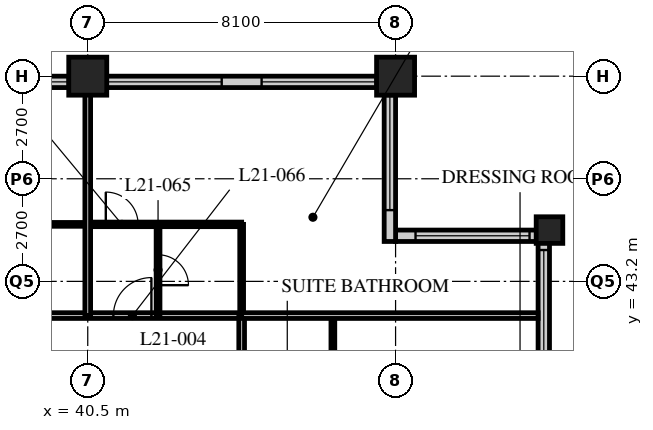
"""IFC4 building model, lengths in metres.
Left out: names, types, materials, properties, quantities, classifications, styles, units other than length and angle.
Written with IfcOpenShell. Run it as: python <this file> out.ifc"""

import sys

from ifc_helpers import new_model, si_unit, direction, frame, frame_2d, origin, origin_2d, place, context, subcontext, project, spatial, rectangle, hollow_rectangle, extrude, element, fill, save


model = new_model("IFC4")
c1 = context("Model", 3, precision=1e-05, world=origin(), true_north=direction((0.0, 1.0)))
c2 = subcontext(c1, "Body", "Model", "MODEL_VIEW")
j1 = project(units=[si_unit("LENGTHUNIT", "METRE"), si_unit("PLANEANGLEUNIT", "RADIAN")], contexts=[c1])
p1 = place(None, origin())
s1 = spatial("IfcSite", under=j1, at=p1, CompositionType="ELEMENT")
p2 = place(p1, origin())
s2 = spatial("IfcBuilding", under=s1, at=p2, CompositionType="ELEMENT")
p3 = place(p2, frame((0.0, 0.0, 84.0)))
s3 = spatial("IfcBuildingStorey", under=s2, at=p3, CompositionType="ELEMENT", Elevation=84.0)
for number, where, z_axis, x_axis in (
    (1, (40.5, 48.6, 0.0), (0.0, 0.0, 1.0), (1.0, 0.0, 0.0)),
    (2, (48.6, 48.6, 0.0), (0.0, 0.0, 1.0), (1.0, 0.0, 0.0)),
):
    element("IfcColumn", number, at=place(p3, frame(where, z_axis=z_axis, x_axis=x_axis)), inside=s3, PredefinedType="COLUMN", context=c2, shape_type="SweptSolid", body=[
        extrude(hollow_rectangle(XDim=1.0, YDim=1.0, WallThickness=0.1, at=origin_2d()), origin(), (0.0, 0.0, 1.0), 3.4),
    ])
p4 = place(p3, frame((52.65, 44.55, 0.0), z_axis=(0.0, 0.0, 1.0), x_axis=(1.0, 0.0, 0.0)))
e3 = element("IfcColumn", 3, at=p4, inside=s3, PredefinedType="COLUMN", context=c2, shape_type="SweptSolid", body=[
    extrude(hollow_rectangle(XDim=0.7, YDim=0.7, WallThickness=0.07, at=origin_2d()), origin(), (0.0, 0.0, 1.0), 3.4),
])
p5 = place(p3, frame((52.5, 40.2, 0.0), z_axis=(0.0, 0.0, 1.0), x_axis=(0.0, 1.0, 0.0)))
e4 = element("IfcWall", 4, at=p5, inside=s3, PredefinedType="SOLIDWALL", context=c2, shape_type="SweptSolid", body=[
    extrude(rectangle(XDim=4.35, YDim=0.3, at=frame_2d((2.175, 0.0))), origin(), (0.0, 0.0, 1.0), 3.19),
])
p6 = place(p5, frame((0.825, 0.0, 0.9)))
e5 = element("IfcOpeningElement", 5, at=p6, cuts=e4, PredefinedType="OPENING", context=c2, shape_type="SweptSolid", body=[
    extrude(rectangle(XDim=3.0, YDim=1.5, at=frame_2d((1.5, 0.75))), frame((0.0, 0.16, 0.0), z_axis=(0.0, -1.0, 0.0), x_axis=(1.0, 0.0, 0.0)), (0.0, 0.0, 1.0), 0.32),
])
p7 = place(p3, frame((52.35, 44.4, 0.0), z_axis=(0.0, 0.0, 1.0), x_axis=(-1.0, 0.0, 0.0)))
e6 = element("IfcWall", 6, at=p7, inside=s3, PredefinedType="SOLIDWALL", context=c2, shape_type="SweptSolid", body=[
    extrude(rectangle(XDim=3.75, YDim=0.3, at=frame_2d((1.875, 0.0))), origin(), (0.0, 0.0, 1.0), 3.19),
])
p8 = place(p7, frame((0.225, 0.0, 0.9)))
e7 = element("IfcOpeningElement", 7, at=p8, cuts=e6, PredefinedType="OPENING", context=c2, shape_type="SweptSolid", body=[
    extrude(rectangle(XDim=3.0, YDim=1.5, at=frame_2d((1.5, 0.75))), frame((0.0, 0.16, 0.0), z_axis=(0.0, -1.0, 0.0), x_axis=(1.0, 0.0, 0.0)), (0.0, 0.0, 1.0), 0.32),
])
p9 = place(p3, frame((48.45, 44.25, 0.0), z_axis=(0.0, 0.0, 1.0), x_axis=(0.0, 1.0, 0.0)))
e8 = element("IfcWall", 8, at=p9, inside=s3, PredefinedType="SOLIDWALL", context=c2, shape_type="SweptSolid", body=[
    extrude(rectangle(XDim=4.35, YDim=0.3, at=frame_2d((2.175, 0.0))), origin(), (0.0, 0.0, 1.0), 3.19),
])
p10 = place(p9, frame((0.825, 0.0, 0.9)))
e9 = element("IfcOpeningElement", 9, at=p10, cuts=e8, PredefinedType="OPENING", context=c2, shape_type="SweptSolid", body=[
    extrude(rectangle(XDim=3.0, YDim=1.5, at=frame_2d((1.5, 0.75))), frame((0.0, 0.16, 0.0), z_axis=(0.0, -1.0, 0.0), x_axis=(1.0, 0.0, 0.0)), (0.0, 0.0, 1.0), 0.32),
])
p11 = place(p3, frame((48.3, 48.45, 0.0), z_axis=(0.0, 0.0, 1.0), x_axis=(-1.0, 0.0, 0.0)))
e10 = element("IfcWall", 10, at=p11, inside=s3, PredefinedType="SOLIDWALL", context=c2, shape_type="SweptSolid", body=[
    extrude(rectangle(XDim=40.2, YDim=0.3, at=frame_2d((20.1, 0.0))), origin(), (0.0, 0.0, 1.0), 3.19),
])
p12 = place(p11, frame((0.225, 0.0, 0.9)))
e11 = element("IfcOpeningElement", 11, at=p12, cuts=e10, PredefinedType="OPENING", context=c2, shape_type="SweptSolid", body=[
    extrude(rectangle(XDim=3.0, YDim=1.5, at=frame_2d((1.5, 0.75))), frame((0.0, 0.16, 0.0), z_axis=(0.0, -1.0, 0.0), x_axis=(1.0, 0.0, 0.0)), (0.0, 0.0, 1.0), 0.32),
])
p13 = place(p11, frame((4.275, 0.0, 0.9)))
e12 = element("IfcOpeningElement", 12, at=p13, cuts=e10, PredefinedType="OPENING", context=c2, shape_type="SweptSolid", body=[
    extrude(rectangle(XDim=3.0, YDim=1.5, at=frame_2d((1.5, 0.75))), frame((0.0, 0.16, 0.0), z_axis=(0.0, -1.0, 0.0), x_axis=(1.0, 0.0, 0.0)), (0.0, 0.0, 1.0), 0.32),
])
p14 = place(p11, frame((8.325, 0.0, 0.9)))
e13 = element("IfcOpeningElement", 13, at=p14, cuts=e10, PredefinedType="OPENING", context=c2, shape_type="SweptSolid", body=[
    extrude(rectangle(XDim=3.0, YDim=1.5, at=frame_2d((1.5, 0.75))), frame((0.0, 0.16, 0.0), z_axis=(0.0, -1.0, 0.0), x_axis=(1.0, 0.0, 0.0)), (0.0, 0.0, 1.0), 0.32),
])
p15 = place(p11, frame((12.375, 0.0, 0.9)))
e14 = element("IfcOpeningElement", 14, at=p15, cuts=e10, PredefinedType="OPENING", context=c2, shape_type="SweptSolid", body=[
    extrude(rectangle(XDim=3.0, YDim=1.5, at=frame_2d((1.5, 0.75))), frame((0.0, 0.16, 0.0), z_axis=(0.0, -1.0, 0.0), x_axis=(1.0, 0.0, 0.0)), (0.0, 0.0, 1.0), 0.32),
])
p16 = place(p11, frame((16.425, 0.0, 0.9)))
e15 = element("IfcOpeningElement", 15, at=p16, cuts=e10, PredefinedType="OPENING", context=c2, shape_type="SweptSolid", body=[
    extrude(rectangle(XDim=3.0, YDim=1.5, at=frame_2d((1.5, 0.75))), frame((0.0, 0.16, 0.0), z_axis=(0.0, -1.0, 0.0), x_axis=(1.0, 0.0, 0.0)), (0.0, 0.0, 1.0), 0.32),
])
p17 = place(p11, frame((20.475, 0.0, 0.9)))
e16 = element("IfcOpeningElement", 16, at=p17, cuts=e10, PredefinedType="OPENING", context=c2, shape_type="SweptSolid", body=[
    extrude(rectangle(XDim=3.0, YDim=1.5, at=frame_2d((1.5, 0.75))), frame((0.0, 0.16, 0.0), z_axis=(0.0, -1.0, 0.0), x_axis=(1.0, 0.0, 0.0)), (0.0, 0.0, 1.0), 0.32),
])
p18 = place(p11, frame((24.525, 0.0, 0.9)))
e17 = element("IfcOpeningElement", 17, at=p18, cuts=e10, PredefinedType="OPENING", context=c2, shape_type="SweptSolid", body=[
    extrude(rectangle(XDim=3.0, YDim=1.5, at=frame_2d((1.5, 0.75))), frame((0.0, 0.16, 0.0), z_axis=(0.0, -1.0, 0.0), x_axis=(1.0, 0.0, 0.0)), (0.0, 0.0, 1.0), 0.32),
])
p19 = place(p11, frame((28.575, 0.0, 0.9)))
e18 = element("IfcOpeningElement", 18, at=p19, cuts=e10, PredefinedType="OPENING", context=c2, shape_type="SweptSolid", body=[
    extrude(rectangle(XDim=3.0, YDim=1.5, at=frame_2d((1.5, 0.75))), frame((0.0, 0.16, 0.0), z_axis=(0.0, -1.0, 0.0), x_axis=(1.0, 0.0, 0.0)), (0.0, 0.0, 1.0), 0.32),
])
p20 = place(p11, frame((32.625, 0.0, 0.9)))
e19 = element("IfcOpeningElement", 19, at=p20, cuts=e10, PredefinedType="OPENING", context=c2, shape_type="SweptSolid", body=[
    extrude(rectangle(XDim=3.0, YDim=1.5, at=frame_2d((1.5, 0.75))), frame((0.0, 0.16, 0.0), z_axis=(0.0, -1.0, 0.0), x_axis=(1.0, 0.0, 0.0)), (0.0, 0.0, 1.0), 0.32),
])
p21 = place(p11, frame((36.675, 0.0, 0.9)))
e20 = element("IfcOpeningElement", 20, at=p21, cuts=e10, PredefinedType="OPENING", context=c2, shape_type="SweptSolid", body=[
    extrude(rectangle(XDim=3.0, YDim=1.5, at=frame_2d((1.5, 0.75))), frame((0.0, 0.16, 0.0), z_axis=(0.0, -1.0, 0.0), x_axis=(1.0, 0.0, 0.0)), (0.0, 0.0, 1.0), 0.32),
])
p22 = place(p3, frame((12.15, 42.3, 0.0), z_axis=(0.0, 0.0, 1.0), x_axis=(1.0, 0.0, 0.0)))
e21 = element("IfcWall", 21, at=p22, inside=s3, PredefinedType="PARTITIONING", context=c2, shape_type="SweptSolid", body=[
    extrude(rectangle(XDim=32.4, YDim=0.15, at=frame_2d((16.2, 0.0))), origin(), (0.0, 0.0, 1.0), 3.19),
])
p23 = place(p22, frame((5.95, 0.0, 0.0)))
e22 = element("IfcOpeningElement", 22, at=p23, cuts=e21, PredefinedType="OPENING", context=c2, shape_type="SweptSolid", body=[
    extrude(rectangle(XDim=1.0, YDim=2.1, at=frame_2d((0.5, 1.05))), frame((0.0, 0.085, 0.0), z_axis=(0.0, -1.0, 0.0), x_axis=(1.0, 0.0, 0.0)), (0.0, 0.0, 1.0), 0.17),
])
p24 = place(p22, frame((14.6, 0.0, 0.0)))
e23 = element("IfcOpeningElement", 23, at=p24, cuts=e21, PredefinedType="OPENING", context=c2, shape_type="SweptSolid", body=[
    extrude(rectangle(XDim=1.0, YDim=2.1, at=frame_2d((0.5, 1.05))), frame((0.0, 0.085, 0.0), z_axis=(0.0, -1.0, 0.0), x_axis=(1.0, 0.0, 0.0)), (0.0, 0.0, 1.0), 0.17),
])
p25 = place(p22, frame((18.65, 0.0, 0.0)))
e24 = element("IfcOpeningElement", 24, at=p25, cuts=e21, PredefinedType="OPENING", context=c2, shape_type="SweptSolid", body=[
    extrude(rectangle(XDim=1.0, YDim=2.1, at=frame_2d((0.5, 1.05))), frame((0.0, 0.085, 0.0), z_axis=(0.0, -1.0, 0.0), x_axis=(1.0, 0.0, 0.0)), (0.0, 0.0, 1.0), 0.17),
])
p26 = place(p22, frame((22.15, 0.0, 0.0)))
e25 = element("IfcOpeningElement", 25, at=p26, cuts=e21, PredefinedType="OPENING", context=c2, shape_type="SweptSolid", body=[
    extrude(rectangle(XDim=1.0, YDim=2.1, at=frame_2d((0.5, 1.05))), frame((0.0, 0.085, 0.0), z_axis=(0.0, -1.0, 0.0), x_axis=(1.0, 0.0, 0.0)), (0.0, 0.0, 1.0), 0.17),
])
p27 = place(p22, frame((29.025, 0.0, 0.0)))
e26 = element("IfcOpeningElement", 26, at=p27, cuts=e21, PredefinedType="OPENING", context=c2, shape_type="SweptSolid", body=[
    extrude(rectangle(XDim=1.0, YDim=2.1, at=frame_2d((0.5, 1.05))), frame((0.0, 0.085, 0.0), z_axis=(0.0, -1.0, 0.0), x_axis=(1.0, 0.0, 0.0)), (0.0, 0.0, 1.0), 0.17),
])
p28 = place(p22, frame((2.375, 0.0, 0.0)))
e27 = element("IfcOpeningElement", 27, at=p28, cuts=e21, PredefinedType="OPENING", context=c2, shape_type="SweptSolid", body=[
    extrude(rectangle(XDim=1.0, YDim=2.1, at=frame_2d((0.5, 1.05))), frame((0.0, 0.085, 0.0), z_axis=(0.0, -1.0, 0.0), x_axis=(1.0, 0.0, 0.0)), (0.0, 0.0, 1.0), 0.17),
])
p29 = place(p3, frame((44.55, 16.2, 0.0), z_axis=(0.0, 0.0, 1.0), x_axis=(0.0, 1.0, 0.0)))
e28 = element("IfcWall", 28, at=p29, inside=s3, PredefinedType="PARTITIONING", context=c2, shape_type="SweptSolid", body=[
    extrude(rectangle(XDim=26.1, YDim=0.15, at=frame_2d((13.05, 0.0))), origin(), (0.0, 0.0, 1.0), 3.19),
])
p30 = place(p29, frame((2.75, 0.0, 0.0)))
e29 = element("IfcOpeningElement", 29, at=p30, cuts=e28, PredefinedType="OPENING", context=c2, shape_type="SweptSolid", body=[
    extrude(rectangle(XDim=1.0, YDim=2.1, at=frame_2d((0.5, 1.05))), frame((0.0, 0.085, 0.0), z_axis=(0.0, -1.0, 0.0), x_axis=(1.0, 0.0, 0.0)), (0.0, 0.0, 1.0), 0.17),
])
p31 = place(p29, frame((6.5, 0.0, 0.0)))
e30 = element("IfcOpeningElement", 30, at=p31, cuts=e28, PredefinedType="OPENING", context=c2, shape_type="SweptSolid", body=[
    extrude(rectangle(XDim=1.0, YDim=2.1, at=frame_2d((0.5, 1.05))), frame((0.0, 0.085, 0.0), z_axis=(0.0, -1.0, 0.0), x_axis=(1.0, 0.0, 0.0)), (0.0, 0.0, 1.0), 0.17),
])
p32 = place(p29, frame((10.0, 0.0, 0.0)))
e31 = element("IfcOpeningElement", 31, at=p32, cuts=e28, PredefinedType="OPENING", context=c2, shape_type="SweptSolid", body=[
    extrude(rectangle(XDim=1.0, YDim=2.1, at=frame_2d((0.5, 1.05))), frame((0.0, 0.085, 0.0), z_axis=(0.0, -1.0, 0.0), x_axis=(1.0, 0.0, 0.0)), (0.0, 0.0, 1.0), 0.17),
])
p33 = place(p29, frame((18.1, 0.0, 0.0)))
e32 = element("IfcOpeningElement", 32, at=p33, cuts=e28, PredefinedType="OPENING", context=c2, shape_type="SweptSolid", body=[
    extrude(rectangle(XDim=1.0, YDim=2.1, at=frame_2d((0.5, 1.05))), frame((0.0, 0.085, 0.0), z_axis=(0.0, -1.0, 0.0), x_axis=(1.0, 0.0, 0.0)), (0.0, 0.0, 1.0), 0.17),
])
for number, where, z_axis, x_axis in (
    (33, (37.9, 44.7, 0.0), (0.0, 0.0, 1.0), (1.0, 0.0, 0.0)),
    (34, (46.95, 39.7, 0.0), (0.0, 0.0, 1.0), (0.0, 1.0, 0.0)),
):
    element("IfcWall", number, at=place(p3, frame(where, z_axis=z_axis, x_axis=x_axis)), inside=s3, PredefinedType="PARTITIONING", context=c2, shape_type="SweptSolid", body=[
        extrude(rectangle(XDim=2.6, YDim=0.1, at=frame_2d((1.3, 0.0))), origin(), (0.0, 0.0, 1.0), 3.19),
    ])
p34 = place(p3, frame((40.5, 44.7, 0.0), z_axis=(0.0, 0.0, 1.0), x_axis=(1.0, 0.0, 0.0)))
e35 = element("IfcWall", 35, at=p34, inside=s3, PredefinedType="PARTITIONING", context=c2, shape_type="SweptSolid", body=[
    extrude(rectangle(XDim=4.05, YDim=0.12, at=frame_2d((2.025, 0.0))), origin(), (0.0, 0.0, 1.0), 3.19),
])
p35 = place(p34, frame((0.475, 0.0, 0.0)))
e36 = element("IfcOpeningElement", 36, at=p35, cuts=e35, PredefinedType="OPENING", context=c2, shape_type="SweptSolid", body=[
    extrude(rectangle(XDim=0.85, YDim=2.1, at=frame_2d((0.425, 1.05))), frame((0.0, 0.07, 0.0), z_axis=(0.0, -1.0, 0.0), x_axis=(1.0, 0.0, 0.0)), (0.0, 0.0, 1.0), 0.14),
])
p36 = place(p3, frame((42.35, 42.3, 0.0), z_axis=(0.0, 0.0, 1.0), x_axis=(0.0, 1.0, 0.0)))
e37 = element("IfcWall", 37, at=p36, inside=s3, PredefinedType="PARTITIONING", context=c2, shape_type="SweptSolid", body=[
    extrude(rectangle(XDim=2.4, YDim=0.1, at=frame_2d((1.2, 0.0))), origin(), (0.0, 0.0, 1.0), 3.19),
])
p37 = place(p36, frame((0.8, 0.0, 0.0)))
e38 = element("IfcOpeningElement", 38, at=p37, cuts=e37, PredefinedType="OPENING", context=c2, shape_type="SweptSolid", body=[
    extrude(rectangle(XDim=0.8, YDim=2.1, at=frame_2d((0.4, 1.05))), frame((0.0, 0.06, 0.0), z_axis=(0.0, -1.0, 0.0), x_axis=(1.0, 0.0, 0.0)), (0.0, 0.0, 1.0), 0.12),
])
p38 = place(p3, frame((44.55, 42.3, 0.0), z_axis=(0.0, 0.0, 1.0), x_axis=(0.0, 1.0, 0.0)))
e39 = element("IfcWall", 39, at=p38, inside=s3, PredefinedType="PARTITIONING", context=c2, shape_type="SweptSolid", body=[
    extrude(rectangle(XDim=2.4, YDim=0.1, at=frame_2d((1.2, 0.0))), origin(), (0.0, 0.0, 1.0), 3.19),
])
p39 = place(p3, frame((44.55, 42.3, 0.0), z_axis=(0.0, 0.0, 1.0), x_axis=(1.0, 0.0, 0.0)))
e40 = element("IfcWall", 40, at=p39, inside=s3, PredefinedType="PARTITIONING", context=c2, shape_type="SweptSolid", body=[
    extrude(rectangle(XDim=7.8, YDim=0.15, at=frame_2d((3.9, 0.0))), origin(), (0.0, 0.0, 1.0), 3.19),
])
p40 = place(p3, frame((40.5, 42.3, 0.0), z_axis=(0.0, 0.0, 1.0), x_axis=(0.0, 1.0, 0.0)))
e41 = element("IfcWall", 41, at=p40, inside=s3, PredefinedType="PARTITIONING", context=c2, shape_type="SweptSolid", body=[
    extrude(rectangle(XDim=6.0, YDim=0.15, at=frame_2d((3.0, 0.0))), origin(), (0.0, 0.0, 1.0), 2.428),
])
p41 = place(p6, origin())
e42 = element("IfcWindow", 42, at=p41, inside=s3, PartitioningType="SINGLE_PANEL", PredefinedType="WINDOW", context=c2, shape_type="SweptSolid", body=[
    extrude(rectangle(XDim=3.0, YDim=1.5, at=frame_2d((1.5, 0.75))), frame((0.0, 0.03, 0.0), z_axis=(0.0, -1.0, 0.0), x_axis=(1.0, 0.0, 0.0)), (0.0, 0.0, 1.0), 0.06),
])
fill(e5, e42)
p42 = place(p8, origin())
e43 = element("IfcWindow", 43, at=p42, inside=s3, PartitioningType="SINGLE_PANEL", PredefinedType="WINDOW", context=c2, shape_type="SweptSolid", body=[
    extrude(rectangle(XDim=3.0, YDim=1.5, at=frame_2d((1.5, 0.75))), frame((0.0, 0.03, 0.0), z_axis=(0.0, -1.0, 0.0), x_axis=(1.0, 0.0, 0.0)), (0.0, 0.0, 1.0), 0.06),
])
fill(e7, e43)
p43 = place(p10, origin())
e44 = element("IfcWindow", 44, at=p43, inside=s3, PartitioningType="SINGLE_PANEL", PredefinedType="WINDOW", context=c2, shape_type="SweptSolid", body=[
    extrude(rectangle(XDim=3.0, YDim=1.5, at=frame_2d((1.5, 0.75))), frame((0.0, 0.03, 0.0), z_axis=(0.0, -1.0, 0.0), x_axis=(1.0, 0.0, 0.0)), (0.0, 0.0, 1.0), 0.06),
])
fill(e9, e44)
p44 = place(p12, origin())
e45 = element("IfcWindow", 45, at=p44, inside=s3, PartitioningType="SINGLE_PANEL", PredefinedType="WINDOW", context=c2, shape_type="SweptSolid", body=[
    extrude(rectangle(XDim=3.0, YDim=1.5, at=frame_2d((1.5, 0.75))), frame((0.0, 0.03, 0.0), z_axis=(0.0, -1.0, 0.0), x_axis=(1.0, 0.0, 0.0)), (0.0, 0.0, 1.0), 0.06),
])
fill(e11, e45)
p45 = place(p13, origin())
e46 = element("IfcWindow", 46, at=p45, inside=s3, PartitioningType="SINGLE_PANEL", PredefinedType="WINDOW", context=c2, shape_type="SweptSolid", body=[
    extrude(rectangle(XDim=3.0, YDim=1.5, at=frame_2d((1.5, 0.75))), frame((0.0, 0.03, 0.0), z_axis=(0.0, -1.0, 0.0), x_axis=(1.0, 0.0, 0.0)), (0.0, 0.0, 1.0), 0.06),
])
fill(e12, e46)
p46 = place(p14, origin())
e47 = element("IfcWindow", 47, at=p46, inside=s3, PartitioningType="SINGLE_PANEL", PredefinedType="WINDOW", context=c2, shape_type="SweptSolid", body=[
    extrude(rectangle(XDim=3.0, YDim=1.5, at=frame_2d((1.5, 0.75))), frame((0.0, 0.03, 0.0), z_axis=(0.0, -1.0, 0.0), x_axis=(1.0, 0.0, 0.0)), (0.0, 0.0, 1.0), 0.06),
])
fill(e13, e47)
p47 = place(p37, origin())
e48 = element("IfcDoor", 48, at=p47, inside=s3, OperationType="SINGLE_SWING_RIGHT", PredefinedType="DOOR", context=c2, shape_type="SweptSolid", body=[
    extrude(rectangle(XDim=0.8, YDim=2.1, at=frame_2d((0.4, 1.05))), frame((0.0, 0.025, 0.0), z_axis=(0.0, -1.0, 0.0), x_axis=(1.0, 0.0, 0.0)), (0.0, 0.0, 1.0), 0.05),
])
fill(e38, e48)
p48 = place(p27, origin())
e49 = element("IfcDoor", 49, at=p48, inside=s3, OperationType="SINGLE_SWING_RIGHT", PredefinedType="DOOR", context=c2, shape_type="SweptSolid", body=[
    extrude(rectangle(XDim=1.0, YDim=2.1, at=frame_2d((0.5, 1.05))), frame((0.0, 0.025, 0.0), z_axis=(0.0, -1.0, 0.0), x_axis=(1.0, 0.0, 0.0)), (0.0, 0.0, 1.0), 0.05),
])
fill(e26, e49)
p49 = place(p35, origin())
e50 = element("IfcDoor", 50, at=p49, inside=s3, OperationType="SINGLE_SWING_LEFT", PredefinedType="DOOR", context=c2, shape_type="SweptSolid", body=[
    extrude(rectangle(XDim=0.85, YDim=2.1, at=frame_2d((0.425, 1.05))), frame((0.0, 0.025, 0.0), z_axis=(0.0, -1.0, 0.0), x_axis=(1.0, 0.0, 0.0)), (0.0, 0.0, 1.0), 0.05),
])
fill(e36, e50)
save(model, sys.argv[1])
